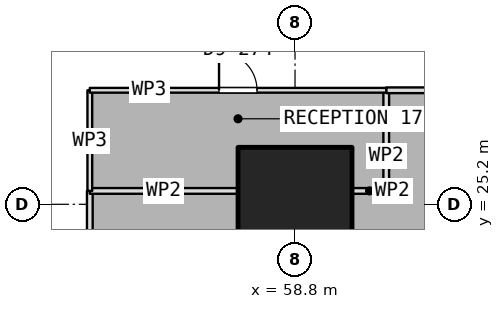
"""IFC4 building model, lengths in metres.
Left out: names, types, materials, properties, quantities, classifications, styles, units other than length and angle.
Written with IfcOpenShell. Run it as: python <this file> out.ifc"""

import sys

from ifc_helpers import new_model, si_unit, direction, frame, frame_2d, origin, origin_2d, place, context, subcontext, project, spatial, rectangle, extrude, element, fill, save


model = new_model("IFC4")
c1 = context("Model", 3, precision=1e-05, world=origin(), true_north=direction((0.0, 1.0)))
c2 = subcontext(c1, "Body", "Model", "MODEL_VIEW")
j1 = project(units=[si_unit("LENGTHUNIT", "METRE"), si_unit("PLANEANGLEUNIT", "RADIAN")], contexts=[c1])
p1 = place(None, origin())
s1 = spatial("IfcSite", under=j1, at=p1, CompositionType="ELEMENT")
p2 = place(p1, origin())
s2 = spatial("IfcBuilding", under=s1, at=p2, CompositionType="ELEMENT")
p3 = place(p2, frame((0.0, 0.0, 77.9)))
s3 = spatial("IfcBuildingStorey", under=s2, at=p3, CompositionType="ELEMENT", Elevation=77.9)
p4 = place(p3, frame((58.8, 25.2, 0.0), z_axis=(0.0, 0.0, 1.0), x_axis=(1.0, 0.0, 0.0)))
e1 = element("IfcColumn", 1, at=p4, inside=s3, PredefinedType="COLUMN", context=c2, shape_type="SweptSolid", body=[
    extrude(rectangle(XDim=3.0, YDim=3.0, at=origin_2d()), origin(), (0.0, 0.0, 1.0), 3.75),
])
p5 = place(p3, frame((53.4, 13.8, 0.0), z_axis=(0.0, 0.0, 1.0), x_axis=(0.0, 1.0, 0.0)))
e2 = element("IfcWall", 2, at=p5, inside=s3, PredefinedType="PARTITIONING", context=c2, shape_type="SweptSolid", body=[
    extrude(rectangle(XDim=11.752, YDim=0.15, at=frame_2d((5.876, 0.0))), origin(), (0.0, 0.0, 1.0), 3.5),
])
p6 = place(p3, frame((53.4, 25.552, 0.0), z_axis=(0.0, 0.0, 1.0), x_axis=(1.0, 0.0, 0.0)))
e3 = element("IfcWall", 3, at=p6, inside=s3, PredefinedType="PARTITIONING", context=c2, shape_type="SweptSolid", body=[
    extrude(rectangle(XDim=3.88, YDim=0.15, at=frame_2d((1.94, 0.0))), origin(), (0.0, 0.0, 1.0), 3.5),
])
p7 = place(p3, frame((60.32, 25.552, 0.0), z_axis=(0.0, 0.0, 1.0), x_axis=(1.0, 0.0, 0.0)))
e4 = element("IfcWall", 4, at=p7, inside=s3, PredefinedType="PARTITIONING", context=c2, shape_type="SweptSolid", body=[
    extrude(rectangle(XDim=0.88, YDim=0.15, at=frame_2d((0.44, 0.0))), origin(), (0.0, 0.0, 1.0), 3.5),
])
p8 = place(p3, frame((61.2, 25.552, 0.0), z_axis=(0.0, 0.0, 1.0), x_axis=(0.0, 1.0, 0.0)))
e5 = element("IfcWall", 5, at=p8, inside=s3, PredefinedType="PARTITIONING", context=c2, shape_type="SweptSolid", body=[
    extrude(rectangle(XDim=2.648, YDim=0.15, at=frame_2d((1.324, 0.0))), origin(), (0.0, 0.0, 1.0), 3.5),
])
p9 = place(p3, frame((61.2, 28.2, 0.0), z_axis=(0.0, 0.0, 1.0), x_axis=(1.0, 0.0, 0.0)))
e6 = element("IfcWall", 6, at=p9, inside=s3, PredefinedType="PARTITIONING", context=c2, shape_type="SweptSolid", body=[
    extrude(rectangle(XDim=8.074, YDim=0.15, at=frame_2d((4.037, 0.0))), origin(), (0.0, 0.0, 1.0), 3.5),
])
p10 = place(p3, frame((53.4, 25.552, 0.0), z_axis=(0.0, 0.0, 1.0), x_axis=(0.0, 1.0, 0.0)))
e7 = element("IfcWall", 7, at=p10, inside=s3, PredefinedType="PARTITIONING", context=c2, shape_type="SweptSolid", body=[
    extrude(rectangle(XDim=2.648, YDim=0.125, at=frame_2d((1.324, 0.0))), origin(), (0.0, 0.0, 1.0), 3.5),
])
p11 = place(p3, frame((53.4, 28.2, 0.0), z_axis=(0.0, 0.0, 1.0), x_axis=(1.0, 0.0, 0.0)))
e8 = element("IfcWall", 8, at=p11, inside=s3, PredefinedType="PARTITIONING", context=c2, shape_type="SweptSolid", body=[
    extrude(rectangle(XDim=7.8, YDim=0.125, at=frame_2d((3.9, 0.0))), origin(), (0.0, 0.0, 1.0), 3.5),
])
p12 = place(p11, frame((3.4, 0.0, 0.0)))
e9 = element("IfcOpeningElement", 9, at=p12, cuts=e8, PredefinedType="OPENING", context=c2, shape_type="SweptSolid", body=[
    extrude(rectangle(XDim=1.0, YDim=2.1, at=frame_2d((0.5, 1.05))), frame((0.0, 0.073, 0.0), z_axis=(0.0, -1.0, 0.0), x_axis=(1.0, 0.0, 0.0)), (0.0, 0.0, 1.0), 0.145),
])
p13 = place(p12, origin())
e10 = element("IfcDoor", 10, at=p13, inside=s3, OperationType="SINGLE_SWING_LEFT", PredefinedType="DOOR", context=c2, shape_type="SweptSolid", body=[
    extrude(rectangle(XDim=1.0, YDim=2.1, at=frame_2d((0.5, 1.05))), frame((0.0, 0.025, 0.0), z_axis=(0.0, -1.0, 0.0), x_axis=(1.0, 0.0, 0.0)), (0.0, 0.0, 1.0), 0.05),
])
fill(e9, e10)
save(model, sys.argv[1])
